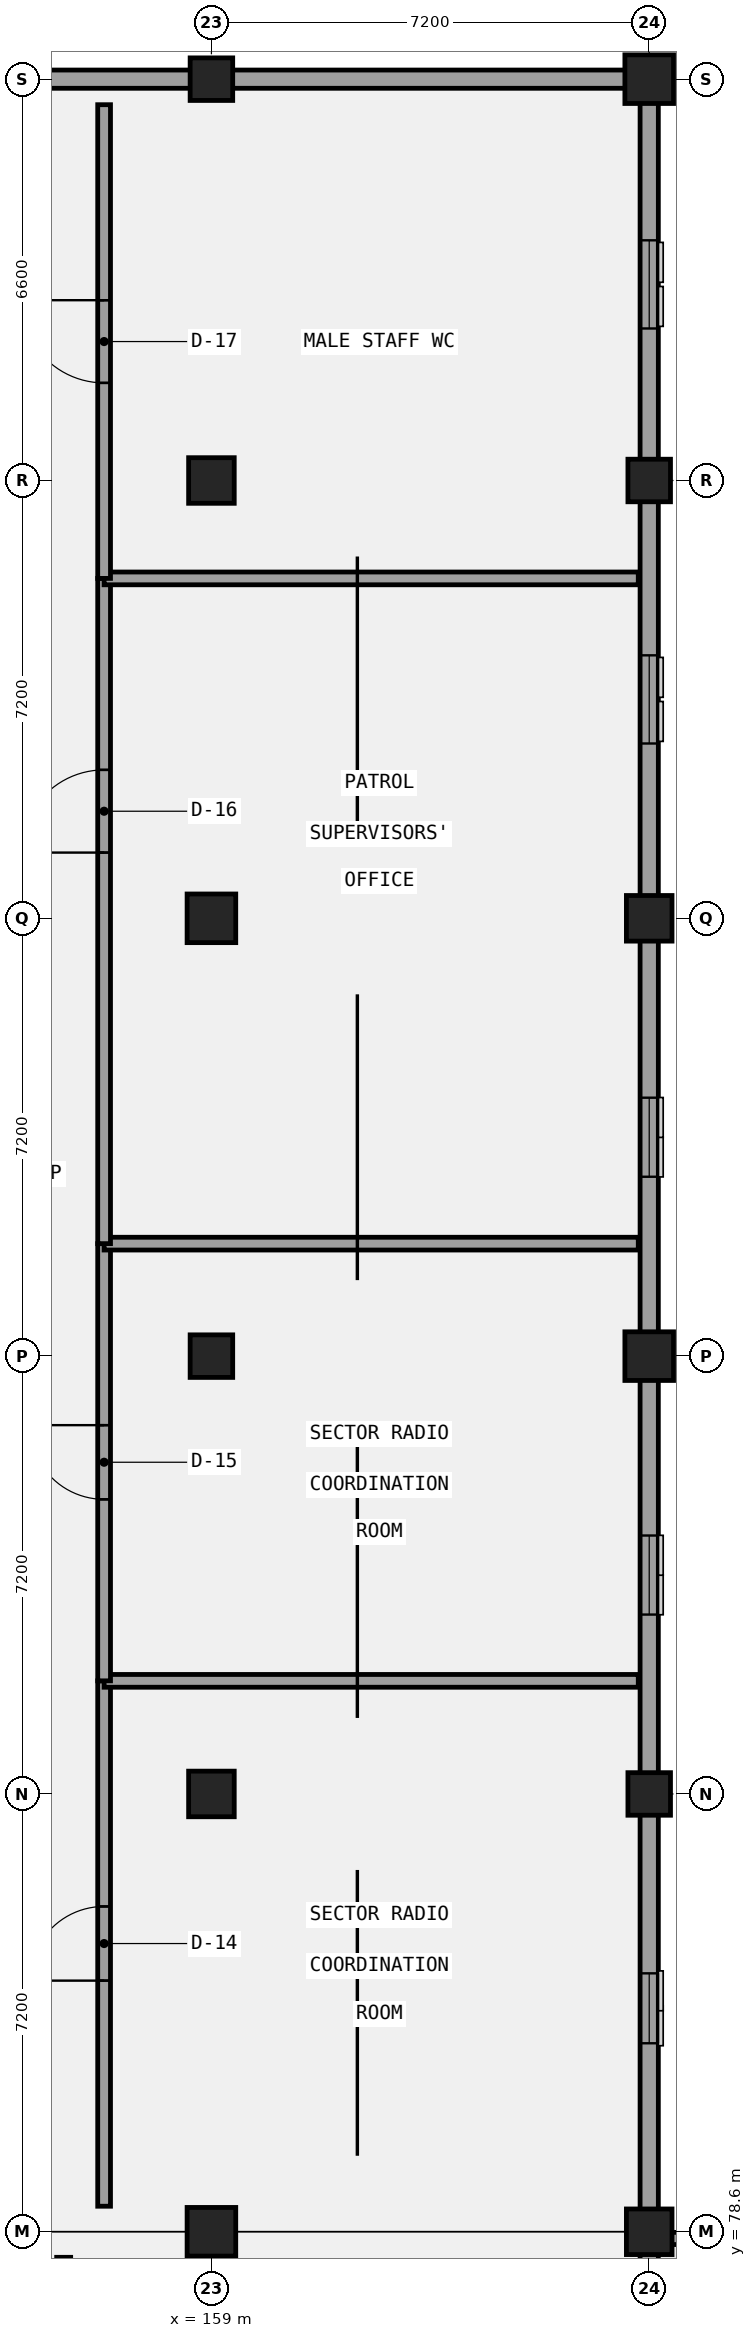
"""IFC4 building model, lengths in metres.
Left out: names, types, materials, properties, quantities, classifications, styles, units other than length and angle.
Written with IfcOpenShell. Run it as: python <this file> out.ifc"""

import sys

from ifc_helpers import new_model, si_unit, direction, frame, frame_2d, origin, origin_2d, place, context, subcontext, project, spatial, rectangle, extrude, element, fill, save


model = new_model("IFC4")
c1 = context("Model", 3, precision=1e-05, world=origin(), true_north=direction((0.0, 1.0)))
c2 = subcontext(c1, "Body", "Model", "MODEL_VIEW")
j1 = project(units=[si_unit("LENGTHUNIT", "METRE"), si_unit("PLANEANGLEUNIT", "RADIAN")], contexts=[c1])
p1 = place(None, origin())
s1 = spatial("IfcSite", under=j1, at=p1, CompositionType="ELEMENT")
p2 = place(p1, origin())
s2 = spatial("IfcBuilding", under=s1, at=p2, CompositionType="ELEMENT")
p3 = place(p2, frame((0.0, 0.0, 5.4)))
s3 = spatial("IfcBuildingStorey", under=s2, at=p3, CompositionType="ELEMENT", Elevation=5.4)
p4 = place(p3, frame((159.0, 78.6, 0.0), z_axis=(0.0, 0.0, 1.0), x_axis=(1.0, 0.0, 0.0)))
e1 = element("IfcColumn", 1, at=p4, inside=s3, PredefinedType="COLUMN", context=c2, shape_type="SweptSolid", body=[
    extrude(rectangle(XDim=0.8, YDim=0.8, at=origin_2d()), origin(), (0.0, 0.0, 1.0), 4.2),
])
p5 = place(p3, frame((159.0, 85.8, 0.0), z_axis=(0.0, 0.0, 1.0), x_axis=(1.0, 0.0, 0.0)))
e2 = element("IfcColumn", 2, at=p5, inside=s3, PredefinedType="COLUMN", context=c2, shape_type="SweptSolid", body=[
    extrude(rectangle(XDim=0.75, YDim=0.75, at=origin_2d()), origin(), (0.0, 0.0, 1.0), 4.2),
])
p6 = place(p3, frame((159.0, 93.0, 0.0), z_axis=(0.0, 0.0, 1.0), x_axis=(1.0, 0.0, 0.0)))
e3 = element("IfcColumn", 3, at=p6, inside=s3, PredefinedType="COLUMN", context=c2, shape_type="SweptSolid", body=[
    extrude(rectangle(XDim=0.7, YDim=0.7, at=origin_2d()), origin(), (0.0, 0.0, 1.0), 4.2),
])
p7 = place(p3, frame((159.0, 100.2, 0.0), z_axis=(0.0, 0.0, 1.0), x_axis=(1.0, 0.0, 0.0)))
e4 = element("IfcColumn", 4, at=p7, inside=s3, PredefinedType="COLUMN", context=c2, shape_type="SweptSolid", body=[
    extrude(rectangle(XDim=0.8, YDim=0.8, at=origin_2d()), origin(), (0.0, 0.0, 1.0), 4.2),
])
p8 = place(p3, frame((159.0, 107.4, 0.0), z_axis=(0.0, 0.0, 1.0), x_axis=(1.0, 0.0, 0.0)))
e5 = element("IfcColumn", 5, at=p8, inside=s3, PredefinedType="COLUMN", context=c2, shape_type="SweptSolid", body=[
    extrude(rectangle(XDim=0.75, YDim=0.75, at=origin_2d()), origin(), (0.0, 0.0, 1.0), 4.2),
])
p9 = place(p3, frame((159.0, 114.0, 0.0), z_axis=(0.0, 0.0, 1.0), x_axis=(1.0, 0.0, 0.0)))
e6 = element("IfcColumn", 6, at=p9, inside=s3, PredefinedType="COLUMN", context=c2, shape_type="SweptSolid", body=[
    extrude(rectangle(XDim=0.7, YDim=0.7, at=origin_2d()), origin(), (0.0, 0.0, 1.0), 4.2),
])
p10 = place(p3, frame((166.2, 78.6, 0.0), z_axis=(0.0, 0.0, 1.0), x_axis=(1.0, 0.0, 0.0)))
e7 = element("IfcColumn", 7, at=p10, inside=s3, PredefinedType="COLUMN", context=c2, shape_type="SweptSolid", body=[
    extrude(rectangle(XDim=0.75, YDim=0.75, at=origin_2d()), origin(), (0.0, 0.0, 1.0), 4.2),
])
p11 = place(p3, frame((166.2, 85.8, 0.0), z_axis=(0.0, 0.0, 1.0), x_axis=(1.0, 0.0, 0.0)))
e8 = element("IfcColumn", 8, at=p11, inside=s3, PredefinedType="COLUMN", context=c2, shape_type="SweptSolid", body=[
    extrude(rectangle(XDim=0.7, YDim=0.7, at=origin_2d()), origin(), (0.0, 0.0, 1.0), 4.2),
])
p12 = place(p3, frame((166.2, 93.0, 0.0), z_axis=(0.0, 0.0, 1.0), x_axis=(1.0, 0.0, 0.0)))
e9 = element("IfcColumn", 9, at=p12, inside=s3, PredefinedType="COLUMN", context=c2, shape_type="SweptSolid", body=[
    extrude(rectangle(XDim=0.8, YDim=0.8, at=origin_2d()), origin(), (0.0, 0.0, 1.0), 4.2),
])
p13 = place(p3, frame((166.2, 100.2, 0.0), z_axis=(0.0, 0.0, 1.0), x_axis=(1.0, 0.0, 0.0)))
e10 = element("IfcColumn", 10, at=p13, inside=s3, PredefinedType="COLUMN", context=c2, shape_type="SweptSolid", body=[
    extrude(rectangle(XDim=0.75, YDim=0.75, at=origin_2d()), origin(), (0.0, 0.0, 1.0), 4.2),
])
p14 = place(p3, frame((166.2, 107.4, 0.0), z_axis=(0.0, 0.0, 1.0), x_axis=(1.0, 0.0, 0.0)))
e11 = element("IfcColumn", 11, at=p14, inside=s3, PredefinedType="COLUMN", context=c2, shape_type="SweptSolid", body=[
    extrude(rectangle(XDim=0.7, YDim=0.7, at=origin_2d()), origin(), (0.0, 0.0, 1.0), 4.2),
])
p15 = place(p3, frame((166.2, 114.0, 0.0), z_axis=(0.0, 0.0, 1.0), x_axis=(1.0, 0.0, 0.0)))
e12 = element("IfcColumn", 12, at=p15, inside=s3, PredefinedType="COLUMN", context=c2, shape_type="SweptSolid", body=[
    extrude(rectangle(XDim=0.8, YDim=0.8, at=origin_2d()), origin(), (0.0, 0.0, 1.0), 4.2),
])
p16 = place(p3, frame((166.2, 50.05, 0.0), z_axis=(0.0, 0.0, 1.0), x_axis=(0.0, 1.0, 0.0)))
e13 = element("IfcWall", 13, at=p16, inside=s3, PredefinedType="SOLIDWALL", context=c2, shape_type="SweptSolid", body=[
    extrude(rectangle(XDim=28.4, YDim=0.3, at=frame_2d((14.2, 0.0))), origin(), (0.0, 0.0, 1.0), 3.17),
])
p17 = place(p16, frame((2.75, 0.0, 1.0)))
e14 = element("IfcOpeningElement", 14, at=p17, cuts=e13, PredefinedType="OPENING", context=c2, shape_type="SweptSolid", body=[
    extrude(rectangle(XDim=1.45, YDim=1.65, at=frame_2d((0.725, 0.825))), frame((0.0, 0.16, 0.0), z_axis=(0.0, -1.0, 0.0), x_axis=(1.0, 0.0, 0.0)), (0.0, 0.0, 1.0), 0.32),
])
p18 = place(p16, frame((9.825, 0.0, 1.0)))
e15 = element("IfcOpeningElement", 15, at=p18, cuts=e13, PredefinedType="OPENING", context=c2, shape_type="SweptSolid", body=[
    extrude(rectangle(XDim=1.45, YDim=1.65, at=frame_2d((0.725, 0.825))), frame((0.0, 0.16, 0.0), z_axis=(0.0, -1.0, 0.0), x_axis=(1.0, 0.0, 0.0)), (0.0, 0.0, 1.0), 0.32),
])
p19 = place(p16, frame((17.025, 0.0, 1.0)))
e16 = element("IfcOpeningElement", 16, at=p19, cuts=e13, PredefinedType="OPENING", context=c2, shape_type="SweptSolid", body=[
    extrude(rectangle(XDim=1.45, YDim=1.65, at=frame_2d((0.725, 0.825))), frame((0.0, 0.16, 0.0), z_axis=(0.0, -1.0, 0.0), x_axis=(1.0, 0.0, 0.0)), (0.0, 0.0, 1.0), 0.32),
])
p20 = place(p16, frame((24.15, 0.0, 1.0)))
e17 = element("IfcOpeningElement", 17, at=p20, cuts=e13, PredefinedType="OPENING", context=c2, shape_type="SweptSolid", body=[
    extrude(rectangle(XDim=1.45, YDim=1.65, at=frame_2d((0.725, 0.825))), frame((0.0, 0.16, 0.0), z_axis=(0.0, -1.0, 0.0), x_axis=(1.0, 0.0, 0.0)), (0.0, 0.0, 1.0), 0.32),
])
p21 = place(p3, frame((166.2, 78.75, 0.0), z_axis=(0.0, 0.0, 1.0), x_axis=(0.0, 1.0, 0.0)))
e18 = element("IfcWall", 18, at=p21, inside=s3, PredefinedType="SOLIDWALL", context=c2, shape_type="SweptSolid", body=[
    extrude(rectangle(XDim=35.1, YDim=0.3, at=frame_2d((17.55, 0.0))), origin(), (0.0, 0.0, 1.0), 2.92),
])
p22 = place(p21, frame((2.95, 0.0, 0.95)))
e19 = element("IfcOpeningElement", 19, at=p22, cuts=e18, PredefinedType="OPENING", context=c2, shape_type="SweptSolid", body=[
    extrude(rectangle(XDim=1.15, YDim=1.65, at=frame_2d((0.575, 0.825))), frame((0.0, 0.16, 0.0), z_axis=(0.0, -1.0, 0.0), x_axis=(1.0, 0.0, 0.0)), (0.0, 0.0, 1.0), 0.32),
])
p23 = place(p21, frame((10.0, 0.0, 0.95)))
e20 = element("IfcOpeningElement", 20, at=p23, cuts=e18, PredefinedType="OPENING", context=c2, shape_type="SweptSolid", body=[
    extrude(rectangle(XDim=1.3, YDim=1.4, at=frame_2d((0.65, 0.7))), frame((0.0, 0.16, 0.0), z_axis=(0.0, -1.0, 0.0), x_axis=(1.0, 0.0, 0.0)), (0.0, 0.0, 1.0), 0.32),
])
p24 = place(p21, frame((17.2, 0.0, 0.95)))
e21 = element("IfcOpeningElement", 21, at=p24, cuts=e18, PredefinedType="OPENING", context=c2, shape_type="SweptSolid", body=[
    extrude(rectangle(XDim=1.3, YDim=1.65, at=frame_2d((0.65, 0.825))), frame((0.0, 0.16, 0.0), z_axis=(0.0, -1.0, 0.0), x_axis=(1.0, 0.0, 0.0)), (0.0, 0.0, 1.0), 0.32),
])
p25 = place(p21, frame((24.325, 0.0, 0.95)))
e22 = element("IfcOpeningElement", 22, at=p25, cuts=e18, PredefinedType="OPENING", context=c2, shape_type="SweptSolid", body=[
    extrude(rectangle(XDim=1.45, YDim=1.4, at=frame_2d((0.725, 0.7))), frame((0.0, 0.16, 0.0), z_axis=(0.0, -1.0, 0.0), x_axis=(1.0, 0.0, 0.0)), (0.0, 0.0, 1.0), 0.32),
])
p26 = place(p21, frame((31.15, 0.0, 0.95)))
e23 = element("IfcOpeningElement", 23, at=p26, cuts=e18, PredefinedType="OPENING", context=c2, shape_type="SweptSolid", body=[
    extrude(rectangle(XDim=1.45, YDim=1.65, at=frame_2d((0.725, 0.825))), frame((0.0, 0.16, 0.0), z_axis=(0.0, -1.0, 0.0), x_axis=(1.0, 0.0, 0.0)), (0.0, 0.0, 1.0), 0.32),
])
p27 = place(p3, frame((166.35, 114.0, 0.0), z_axis=(0.0, 0.0, 1.0), x_axis=(-1.0, 0.0, 0.0)))
e24 = element("IfcWall", 24, at=p27, inside=s3, PredefinedType="SOLIDWALL", context=c2, shape_type="SweptSolid", body=[
    extrude(rectangle(XDim=21.9, YDim=0.3, at=frame_2d((10.95, 0.0))), origin(), (0.0, 0.0, 1.0), 3.17),
])
p28 = place(p27, frame((17.65, 0.0, 0.95)))
e25 = element("IfcOpeningElement", 25, at=p28, cuts=e24, PredefinedType="OPENING", context=c2, shape_type="SweptSolid", body=[
    extrude(rectangle(XDim=1.0, YDim=1.9, at=frame_2d((0.5, 0.95))), frame((0.0, 0.16, 0.0), z_axis=(0.0, -1.0, 0.0), x_axis=(1.0, 0.0, 0.0)), (0.0, 0.0, 1.0), 0.32),
])
p29 = place(p3, frame((166.42, 78.49, 0.0), z_axis=(0.0, 0.0, 1.0), x_axis=(1.0, 0.0, 0.0)))
e26 = element("IfcWall", 26, at=p29, inside=s3, PredefinedType="PARAPET", context=c2, shape_type="SweptSolid", body=[
    extrude(rectangle(XDim=7.47, YDim=0.2, at=frame_2d((3.735, 0.0))), origin(), (0.0, 0.0, 1.0), 1.12),
])
p30 = place(p3, frame((157.235, 79.02, 0.0), z_axis=(0.0, 0.0, 1.0), x_axis=(0.0, 1.0, 0.0)))
e27 = element("IfcWall", 27, at=p30, inside=s3, PredefinedType="PARTITIONING", context=c2, shape_type="SweptSolid", body=[
    extrude(rectangle(XDim=8.64, YDim=0.21, at=frame_2d((4.32, 0.0))), origin(), (0.0, 0.0, 1.0), 3.92),
])
p31 = place(p30, frame((3.71, 0.0, 0.0)))
e28 = element("IfcOpeningElement", 28, at=p31, cuts=e27, PredefinedType="OPENING", context=c2, shape_type="SweptSolid", body=[
    extrude(rectangle(XDim=1.22, YDim=2.22, at=frame_2d((0.61, 1.11))), frame((0.0, 0.115, 0.0), z_axis=(0.0, -1.0, 0.0), x_axis=(1.0, 0.0, 0.0)), (0.0, 0.0, 1.0), 0.23),
])
p32 = place(p3, frame((157.235, 87.66, 0.0), z_axis=(0.0, 0.0, 1.0), x_axis=(1.0, 0.0, 0.0)))
e29 = element("IfcWall", 29, at=p32, inside=s3, PredefinedType="PARTITIONING", context=c2, shape_type="SweptSolid", body=[
    extrude(rectangle(XDim=8.785, YDim=0.21, at=frame_2d((4.393, 0.0))), origin(), (0.0, 0.0, 1.0), 3.37),
])
p33 = place(p3, frame((157.235, 87.66, 0.0), z_axis=(0.0, 0.0, 1.0), x_axis=(0.0, 1.0, 0.0)))
e30 = element("IfcWall", 30, at=p33, inside=s3, PredefinedType="PARTITIONING", context=c2, shape_type="SweptSolid", body=[
    extrude(rectangle(XDim=7.19, YDim=0.21, at=frame_2d((3.595, 0.0))), origin(), (0.0, 0.0, 1.0), 3.92),
])
p34 = place(p33, frame((2.985, 0.0, 0.0)))
e31 = element("IfcOpeningElement", 31, at=p34, cuts=e30, PredefinedType="OPENING", context=c2, shape_type="SweptSolid", body=[
    extrude(rectangle(XDim=1.22, YDim=2.35, at=frame_2d((0.61, 1.175))), frame((0.0, 0.115, 0.0), z_axis=(0.0, -1.0, 0.0), x_axis=(1.0, 0.0, 0.0)), (0.0, 0.0, 1.0), 0.23),
])
p35 = place(p3, frame((157.235, 94.85, 0.0), z_axis=(0.0, 0.0, 1.0), x_axis=(1.0, 0.0, 0.0)))
e32 = element("IfcWall", 32, at=p35, inside=s3, PredefinedType="PARTITIONING", context=c2, shape_type="SweptSolid", body=[
    extrude(rectangle(XDim=8.785, YDim=0.21, at=frame_2d((4.393, 0.0))), origin(), (0.0, 0.0, 1.0), 3.37),
])
p36 = place(p3, frame((157.235, 94.85, 0.0), z_axis=(0.0, 0.0, 1.0), x_axis=(0.0, 1.0, 0.0)))
e33 = element("IfcWall", 33, at=p36, inside=s3, PredefinedType="PARTITIONING", context=c2, shape_type="SweptSolid", body=[
    extrude(rectangle(XDim=10.94, YDim=0.21, at=frame_2d((5.47, 0.0))), origin(), (0.0, 0.0, 1.0), 3.92),
])
p37 = place(p36, frame((6.431, 0.0, 0.0)))
e34 = element("IfcOpeningElement", 34, at=p37, cuts=e33, PredefinedType="OPENING", context=c2, shape_type="SweptSolid", body=[
    extrude(rectangle(XDim=1.36, YDim=2.1, at=frame_2d((0.68, 1.05))), frame((0.0, 0.115, 0.0), z_axis=(0.0, -1.0, 0.0), x_axis=(1.0, 0.0, 0.0)), (0.0, 0.0, 1.0), 0.23),
])
p38 = place(p3, frame((157.235, 105.79, 0.0), z_axis=(0.0, 0.0, 1.0), x_axis=(1.0, 0.0, 0.0)))
e35 = element("IfcWall", 35, at=p38, inside=s3, PredefinedType="PARTITIONING", context=c2, shape_type="SweptSolid", body=[
    extrude(rectangle(XDim=8.785, YDim=0.21, at=frame_2d((4.393, 0.0))), origin(), (0.0, 0.0, 1.0), 3.37),
])
p39 = place(p3, frame((157.235, 105.79, 0.0), z_axis=(0.0, 0.0, 1.0), x_axis=(0.0, 1.0, 0.0)))
e36 = element("IfcWall", 36, at=p39, inside=s3, PredefinedType="PARTITIONING", context=c2, shape_type="SweptSolid", body=[
    extrude(rectangle(XDim=7.79, YDim=0.21, at=frame_2d((3.895, 0.0))), origin(), (0.0, 0.0, 1.0), 3.92),
])
p40 = place(p39, frame((3.215, 0.0, 0.0)))
e37 = element("IfcOpeningElement", 37, at=p40, cuts=e36, PredefinedType="OPENING", context=c2, shape_type="SweptSolid", body=[
    extrude(rectangle(XDim=1.36, YDim=2.22, at=frame_2d((0.68, 1.11))), frame((0.0, 0.115, 0.0), z_axis=(0.0, -1.0, 0.0), x_axis=(1.0, 0.0, 0.0)), (0.0, 0.0, 1.0), 0.23),
])
p41 = place(p3, frame((156.57, 72.634, 0.0), z_axis=(0.0, 0.0, 1.0), x_axis=(0.0, 1.0, 0.0)))
e38 = element("IfcWall", 38, at=p41, inside=s3, PredefinedType="PARTITIONING", context=c2, shape_type="SweptSolid", body=[
    extrude(rectangle(XDim=5.546, YDim=0.23, at=frame_2d((2.773, 0.0))), origin(), (0.0, 0.0, 1.0), 3.92),
])
p42 = place(p41, frame((2.093, 0.0, 0.0)))
e39 = element("IfcOpeningElement", 39, at=p42, cuts=e38, PredefinedType="OPENING", context=c2, shape_type="SweptSolid", body=[
    extrude(rectangle(XDim=1.36, YDim=2.1, at=frame_2d((0.68, 1.05))), frame((0.0, 0.125, 0.0), z_axis=(0.0, -1.0, 0.0), x_axis=(1.0, 0.0, 0.0)), (0.0, 0.0, 1.0), 0.25),
])
p43 = place(p22, origin())
e40 = element("IfcWindow", 40, at=p43, inside=s3, PartitioningType="SINGLE_PANEL", PredefinedType="WINDOW", context=c2, shape_type="SweptSolid", body=[
    extrude(rectangle(XDim=1.15, YDim=1.65, at=frame_2d((0.575, 0.825))), frame((0.0, 0.03, 0.0), z_axis=(0.0, -1.0, 0.0), x_axis=(1.0, 0.0, 0.0)), (0.0, 0.0, 1.0), 0.06),
])
fill(e19, e40)
p44 = place(p23, origin())
e41 = element("IfcWindow", 41, at=p44, inside=s3, PartitioningType="SINGLE_PANEL", PredefinedType="WINDOW", context=c2, shape_type="SweptSolid", body=[
    extrude(rectangle(XDim=1.3, YDim=1.4, at=frame_2d((0.65, 0.7))), frame((0.0, 0.03, 0.0), z_axis=(0.0, -1.0, 0.0), x_axis=(1.0, 0.0, 0.0)), (0.0, 0.0, 1.0), 0.06),
])
fill(e20, e41)
p45 = place(p24, origin())
e42 = element("IfcWindow", 42, at=p45, inside=s3, PartitioningType="SINGLE_PANEL", PredefinedType="WINDOW", context=c2, shape_type="SweptSolid", body=[
    extrude(rectangle(XDim=1.3, YDim=1.65, at=frame_2d((0.65, 0.825))), frame((0.0, 0.03, 0.0), z_axis=(0.0, -1.0, 0.0), x_axis=(1.0, 0.0, 0.0)), (0.0, 0.0, 1.0), 0.06),
])
fill(e21, e42)
p46 = place(p25, origin())
e43 = element("IfcWindow", 43, at=p46, inside=s3, PartitioningType="SINGLE_PANEL", PredefinedType="WINDOW", context=c2, shape_type="SweptSolid", body=[
    extrude(rectangle(XDim=1.45, YDim=1.4, at=frame_2d((0.725, 0.7))), frame((0.0, 0.03, 0.0), z_axis=(0.0, -1.0, 0.0), x_axis=(1.0, 0.0, 0.0)), (0.0, 0.0, 1.0), 0.06),
])
fill(e22, e43)
p47 = place(p26, origin())
e44 = element("IfcWindow", 44, at=p47, inside=s3, PartitioningType="SINGLE_PANEL", PredefinedType="WINDOW", context=c2, shape_type="SweptSolid", body=[
    extrude(rectangle(XDim=1.45, YDim=1.65, at=frame_2d((0.725, 0.825))), frame((0.0, 0.03, 0.0), z_axis=(0.0, -1.0, 0.0), x_axis=(1.0, 0.0, 0.0)), (0.0, 0.0, 1.0), 0.06),
])
fill(e23, e44)
p48 = place(p31, origin())
e45 = element("IfcDoor", 45, at=p48, inside=s3, OperationType="SINGLE_SWING_LEFT", PredefinedType="DOOR", context=c2, shape_type="SweptSolid", body=[
    extrude(rectangle(XDim=1.22, YDim=2.22, at=frame_2d((0.61, 1.11))), frame((0.0, 0.025, 0.0), z_axis=(0.0, -1.0, 0.0), x_axis=(1.0, 0.0, 0.0)), (0.0, 0.0, 1.0), 0.05),
])
fill(e28, e45)
p49 = place(p34, origin())
e46 = element("IfcDoor", 46, at=p49, inside=s3, OperationType="SINGLE_SWING_RIGHT", PredefinedType="DOOR", context=c2, shape_type="SweptSolid", body=[
    extrude(rectangle(XDim=1.22, YDim=2.35, at=frame_2d((0.61, 1.175))), frame((0.0, 0.025, 0.0), z_axis=(0.0, -1.0, 0.0), x_axis=(1.0, 0.0, 0.0)), (0.0, 0.0, 1.0), 0.05),
])
fill(e31, e46)
p50 = place(p37, origin())
e47 = element("IfcDoor", 47, at=p50, inside=s3, OperationType="SINGLE_SWING_LEFT", PredefinedType="DOOR", context=c2, shape_type="SweptSolid", body=[
    extrude(rectangle(XDim=1.36, YDim=2.1, at=frame_2d((0.68, 1.05))), frame((0.0, 0.025, 0.0), z_axis=(0.0, -1.0, 0.0), x_axis=(1.0, 0.0, 0.0)), (0.0, 0.0, 1.0), 0.05),
])
fill(e34, e47)
p51 = place(p40, origin())
e48 = element("IfcDoor", 48, at=p51, inside=s3, OperationType="SINGLE_SWING_RIGHT", PredefinedType="DOOR", context=c2, shape_type="SweptSolid", body=[
    extrude(rectangle(XDim=1.36, YDim=2.22, at=frame_2d((0.68, 1.11))), frame((0.0, 0.025, 0.0), z_axis=(0.0, -1.0, 0.0), x_axis=(1.0, 0.0, 0.0)), (0.0, 0.0, 1.0), 0.05),
])
fill(e37, e48)
save(model, sys.argv[1])
